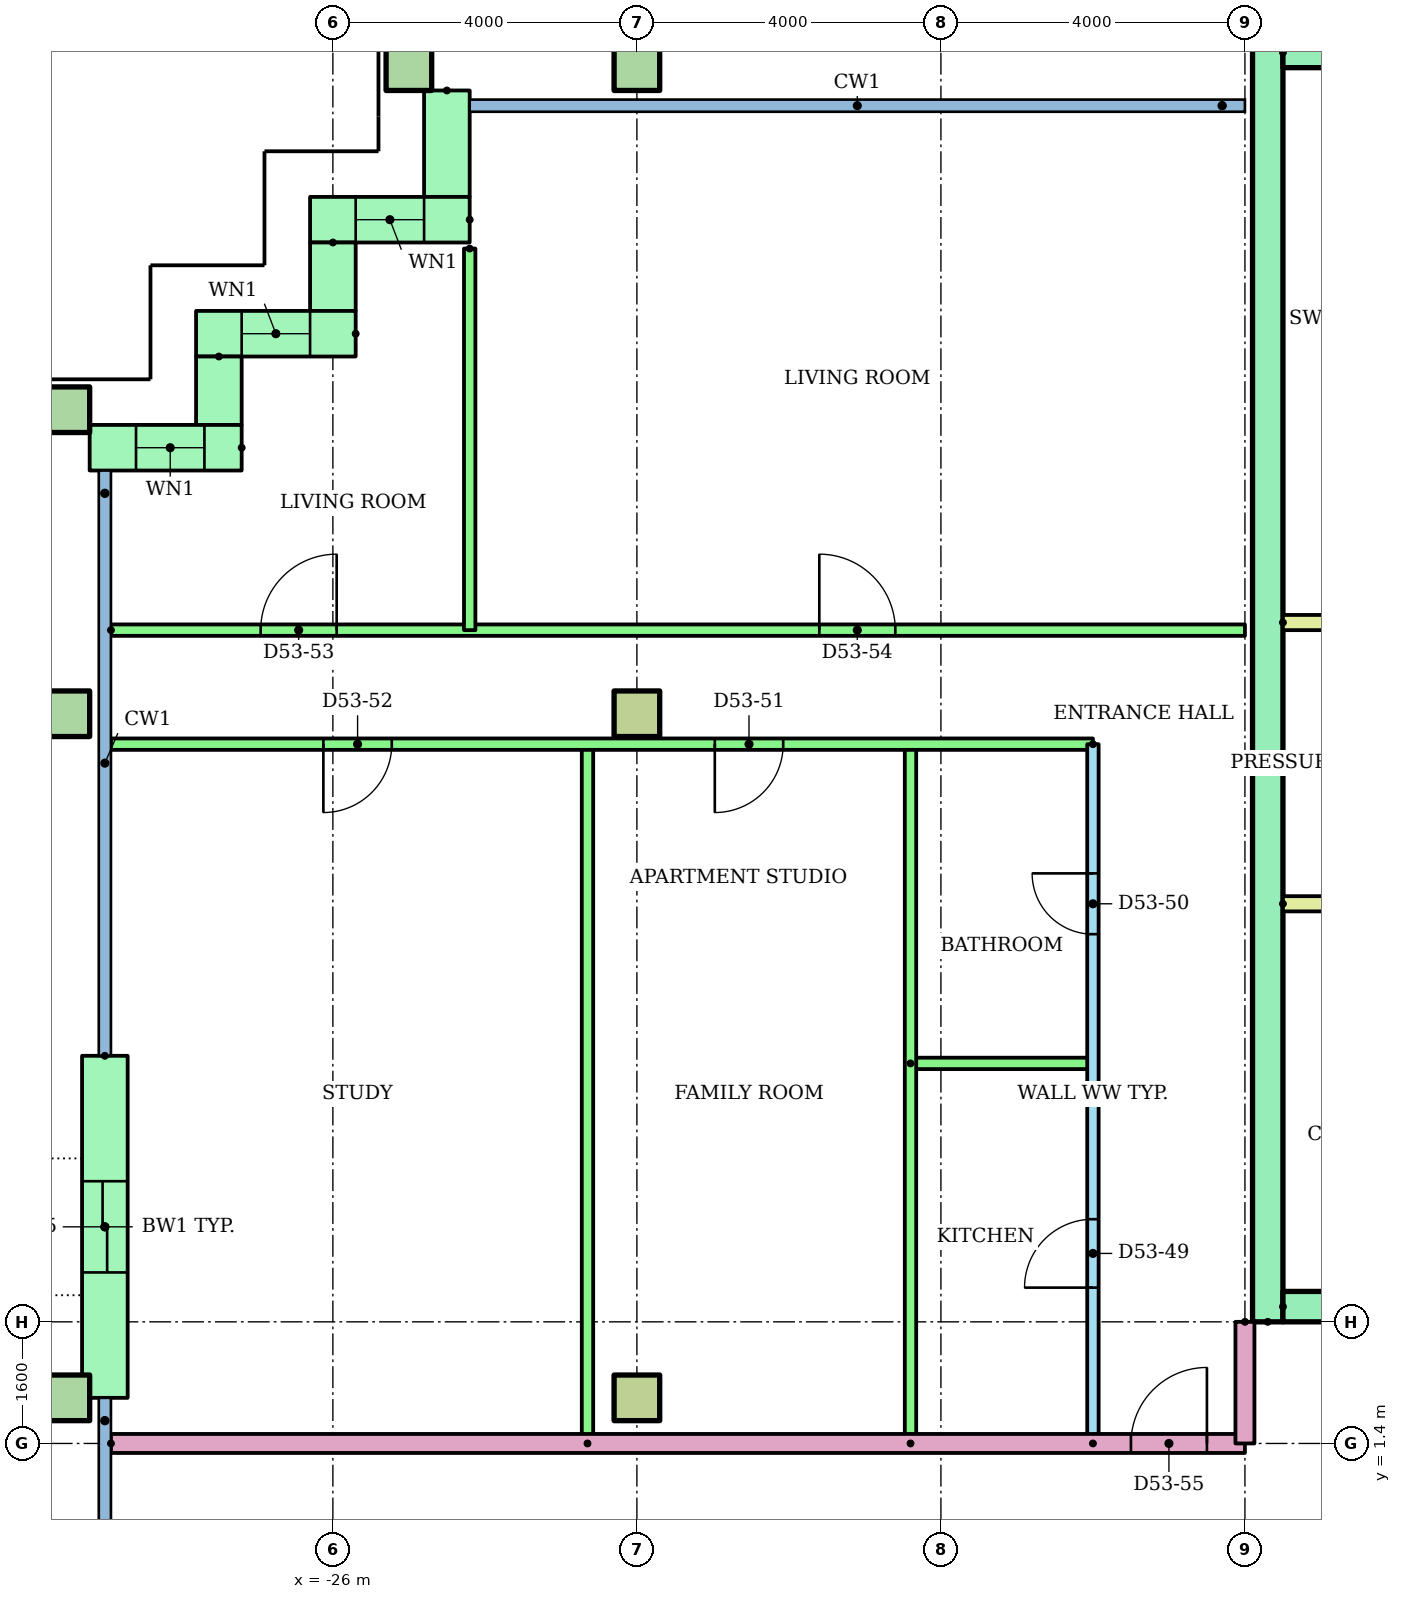
"""IFC4 building model, lengths in metres.
Left out: names, types, materials, properties, quantities, classifications, styles, units other than length and angle.
Written with IfcOpenShell. Run it as: python <this file> out.ifc"""

import sys

from ifc_helpers import new_model, si_unit, direction, frame, frame_2d, origin, origin_2d, place, context, subcontext, project, spatial, rectangle, hollow_rectangle, extrude, element, fill, save


model = new_model("IFC4")
c1 = context("Model", 3, precision=1e-05, world=origin(), true_north=direction((0.0, 1.0)))
c2 = subcontext(c1, "Body", "Model", "MODEL_VIEW")
j1 = project(units=[si_unit("LENGTHUNIT", "METRE"), si_unit("PLANEANGLEUNIT", "RADIAN")], contexts=[c1])
p1 = place(None, origin())
s1 = spatial("IfcSite", under=j1, at=p1, CompositionType="ELEMENT")
p2 = place(p1, origin())
s2 = spatial("IfcBuilding", under=s1, at=p2, CompositionType="ELEMENT")
p3 = place(p2, frame((0.0, 0.0, 207.6)))
s3 = spatial("IfcBuildingStorey", under=s2, at=p3, CompositionType="ELEMENT", Elevation=207.6)
p4 = place(p3, frame((-29.5, 2.0, 0.0)))
e1 = element("IfcColumn", 1, at=p4, inside=s3, PredefinedType="COLUMN", context=c2, shape_type="SweptSolid", body=[
    extrude(hollow_rectangle(XDim=0.6, YDim=0.6, WallThickness=0.03, at=origin_2d()), origin(), (0.0, 0.0, 1.0), 3.2),
])
p5 = place(p3, frame((-22.0, 2.0, 0.0)))
e2 = element("IfcColumn", 2, at=p5, inside=s3, PredefinedType="COLUMN", context=c2, shape_type="SweptSolid", body=[
    extrude(rectangle(XDim=0.6, YDim=0.6, at=origin_2d()), origin(), (0.0, 0.0, 1.0), 3.2),
])
p6 = place(p3, frame((-29.5, 11.0, 0.0)))
e3 = element("IfcColumn", 3, at=p6, inside=s3, PredefinedType="COLUMN", context=c2, shape_type="SweptSolid", body=[
    extrude(hollow_rectangle(XDim=0.6, YDim=0.6, WallThickness=0.03, at=origin_2d()), origin(), (0.0, 0.0, 1.0), 3.2),
])
p7 = place(p3, frame((-22.0, 11.0, 0.0)))
e4 = element("IfcColumn", 4, at=p7, inside=s3, PredefinedType="COLUMN", context=c2, shape_type="SweptSolid", body=[
    extrude(rectangle(XDim=0.6, YDim=0.6, at=origin_2d()), origin(), (0.0, 0.0, 1.0), 3.2),
])
for number, where in (
    (5, (-29.5, 15.0, 0.0)),
    (6, (-25.0, 19.5, 0.0)),
    (7, (-22.0, 19.5, 0.0)),
):
    element("IfcColumn", number, at=place(p3, frame(where)), inside=s3, PredefinedType="COLUMN", context=c2, shape_type="SweptSolid", body=[
        extrude(hollow_rectangle(XDim=0.6, YDim=0.6, WallThickness=0.03, at=origin_2d()), origin(), (0.0, 0.0, 1.0), 3.2),
    ])
p8 = place(p3, frame((-24.5, 19.2, 0.0), z_axis=(0.0, 0.0, 1.0), x_axis=(0.0, -1.0, 0.0)))
e8 = element("IfcWall", 8, at=p8, inside=s3, PredefinedType="STANDARD", context=c2, shape_type="SweptSolid", body=[
    extrude(rectangle(XDim=1.4, YDim=0.6, at=frame_2d((0.7, 0.0))), origin(), (0.0, 0.0, 1.0), 2.92),
])
p9 = place(p3, frame((-24.2, 17.5, 0.0), z_axis=(0.0, 0.0, 1.0), x_axis=(-1.0, 0.0, 0.0)))
e9 = element("IfcWall", 9, at=p9, inside=s3, PredefinedType="STANDARD", context=c2, shape_type="SweptSolid", body=[
    extrude(rectangle(XDim=2.1, YDim=0.6, at=frame_2d((1.05, 0.0))), origin(), (0.0, 0.0, 1.0), 2.92),
])
p10 = place(p9, frame((0.6, 0.0, 0.9)))
e10 = element("IfcOpeningElement", 10, at=p10, cuts=e9, PredefinedType="OPENING", context=c2, shape_type="SweptSolid", body=[
    extrude(rectangle(XDim=0.9, YDim=1.5, at=frame_2d((0.45, 0.75))), frame((0.0, 0.31, 0.0), z_axis=(0.0, -1.0, 0.0), x_axis=(1.0, 0.0, 0.0)), (0.0, 0.0, 1.0), 0.62),
])
p11 = place(p3, frame((-26.0, 17.2, 0.0), z_axis=(0.0, 0.0, 1.0), x_axis=(0.0, -1.0, 0.0)))
e11 = element("IfcWall", 11, at=p11, inside=s3, PredefinedType="STANDARD", context=c2, shape_type="SweptSolid", body=[
    extrude(rectangle(XDim=0.9, YDim=0.6, at=frame_2d((0.45, 0.0))), origin(), (0.0, 0.0, 1.0), 2.92),
])
p12 = place(p3, frame((-25.7, 16.0, 0.0), z_axis=(0.0, 0.0, 1.0), x_axis=(-1.0, 0.0, 0.0)))
e12 = element("IfcWall", 12, at=p12, inside=s3, PredefinedType="STANDARD", context=c2, shape_type="SweptSolid", body=[
    extrude(rectangle(XDim=2.1, YDim=0.6, at=frame_2d((1.05, 0.0))), origin(), (0.0, 0.0, 1.0), 2.92),
])
p13 = place(p12, frame((0.6, 0.0, 0.9)))
e13 = element("IfcOpeningElement", 13, at=p13, cuts=e12, PredefinedType="OPENING", context=c2, shape_type="SweptSolid", body=[
    extrude(rectangle(XDim=0.9, YDim=1.5, at=frame_2d((0.45, 0.75))), frame((0.0, 0.31, 0.0), z_axis=(0.0, -1.0, 0.0), x_axis=(1.0, 0.0, 0.0)), (0.0, 0.0, 1.0), 0.62),
])
p14 = place(p3, frame((-27.5, 15.7, 0.0), z_axis=(0.0, 0.0, 1.0), x_axis=(0.0, -1.0, 0.0)))
e14 = element("IfcWall", 14, at=p14, inside=s3, PredefinedType="STANDARD", context=c2, shape_type="SweptSolid", body=[
    extrude(rectangle(XDim=0.9, YDim=0.6, at=frame_2d((0.45, 0.0))), origin(), (0.0, 0.0, 1.0), 2.92),
])
p15 = place(p3, frame((-27.2, 14.5, 0.0), z_axis=(0.0, 0.0, 1.0), x_axis=(-1.0, 0.0, 0.0)))
e15 = element("IfcWall", 15, at=p15, inside=s3, PredefinedType="STANDARD", context=c2, shape_type="SweptSolid", body=[
    extrude(rectangle(XDim=2.0, YDim=0.6, at=frame_2d((1.0, 0.0))), origin(), (0.0, 0.0, 1.0), 2.92),
])
p16 = place(p15, frame((0.49, 0.0, 0.9)))
e16 = element("IfcOpeningElement", 16, at=p16, cuts=e15, PredefinedType="OPENING", context=c2, shape_type="SweptSolid", body=[
    extrude(rectangle(XDim=0.9, YDim=1.5, at=frame_2d((0.45, 0.75))), frame((0.0, 0.31, 0.0), z_axis=(0.0, -1.0, 0.0), x_axis=(1.0, 0.0, 0.0)), (0.0, 0.0, 1.0), 0.62),
])
p17 = place(p3, frame((-29.0, 6.5, 0.0), z_axis=(0.0, 0.0, 1.0), x_axis=(0.0, -1.0, 0.0)))
e17 = element("IfcWall", 17, at=p17, inside=s3, PredefinedType="STANDARD", context=c2, shape_type="SweptSolid", body=[
    extrude(rectangle(XDim=4.5, YDim=0.6, at=frame_2d((2.25, 0.0))), origin(), (0.0, 0.0, 1.0), 2.92),
])
p18 = place(p17, frame((1.65, 0.0, 0.0)))
e18 = element("IfcOpeningElement", 18, at=p18, cuts=e17, PredefinedType="OPENING", context=c2, shape_type="SweptSolid", body=[
    extrude(rectangle(XDim=1.2, YDim=2.1, at=frame_2d((0.6, 1.05))), frame((0.0, 0.31, 0.0), z_axis=(0.0, -1.0, 0.0), x_axis=(1.0, 0.0, 0.0)), (0.0, 0.0, 1.0), 0.62),
])
p19 = place(p3, frame((-13.7, 3.0, 0.0), z_axis=(0.0, 0.0, 1.0), x_axis=(0.0, 1.0, 0.0)))
e19 = element("IfcWall", 19, at=p19, inside=s3, PredefinedType="SHEAR", context=c2, shape_type="SweptSolid", body=[
    extrude(rectangle(XDim=17.0, YDim=0.4, at=frame_2d((8.5, 0.0))), origin(), (0.0, 0.0, 1.0), 2.92),
])
p20 = place(p3, frame((-13.5, 19.7, 0.0)))
e20 = element("IfcWall", 20, at=p20, inside=s3, PredefinedType="SHEAR", context=c2, shape_type="SweptSolid", body=[
    extrude(rectangle(XDim=27.0, YDim=0.4, at=frame_2d((13.5, 0.0))), origin(), (0.0, 0.0, 1.0), 2.92),
])
p21 = place(p3, frame((-13.5, 3.2, 0.0)))
e21 = element("IfcWall", 21, at=p21, inside=s3, PredefinedType="SHEAR", context=c2, shape_type="SweptSolid", body=[
    extrude(rectangle(XDim=27.0, YDim=0.4, at=frame_2d((13.5, 0.0))), origin(), (0.0, 0.0, 1.0), 2.92),
])
p22 = place(p21, frame((22.083, 0.0, 0.0)))
e22 = element("IfcOpeningElement", 22, at=p22, cuts=e21, PredefinedType="OPENING", context=c2, shape_type="SweptSolid", body=[
    extrude(rectangle(XDim=1.1, YDim=2.1, at=frame_2d((0.55, 1.05))), frame((0.0, 0.21, 0.0), z_axis=(0.0, -1.0, 0.0), x_axis=(1.0, 0.0, 0.0)), (0.0, 0.0, 1.0), 0.42),
])
p23 = place(p21, frame((25.128, 0.0, 0.0)))
e23 = element("IfcOpeningElement", 23, at=p23, cuts=e21, PredefinedType="OPENING", context=c2, shape_type="SweptSolid", body=[
    extrude(rectangle(XDim=1.1, YDim=2.1, at=frame_2d((0.55, 1.05))), frame((0.0, 0.21, 0.0), z_axis=(0.0, -1.0, 0.0), x_axis=(1.0, 0.0, 0.0)), (0.0, 0.0, 1.0), 0.42),
])
p24 = place(p21, frame((12.6, 0.0, 0.0)))
e24 = element("IfcOpeningElement", 24, at=p24, cuts=e21, PredefinedType="OPENING", context=c2, shape_type="SweptSolid", body=[
    extrude(rectangle(XDim=1.8, YDim=2.1, at=frame_2d((0.9, 1.05))), frame((0.0, 0.21, 0.0), z_axis=(0.0, -1.0, 0.0), x_axis=(1.0, 0.0, 0.0)), (0.0, 0.0, 1.0), 0.42),
])
for number, where in (
    (25, (-13.5, 8.5, 0.0)),
    (26, (-13.5, 12.2, 0.0)),
):
    element("IfcWall", number, at=place(p3, frame(where)), inside=s3, PredefinedType="PARTITIONING", context=c2, shape_type="SweptSolid", body=[
        extrude(rectangle(XDim=3.9, YDim=0.2, at=frame_2d((1.95, 0.0))), origin(), (0.0, 0.0, 1.0), 2.92),
    ])
p25 = place(p3, frame((-16.0, 1.4, 0.0), z_axis=(0.0, 0.0, 1.0), x_axis=(0.0, 1.0, 0.0)))
e27 = element("IfcWall", 27, at=p25, inside=s3, PredefinedType="PARTITIONING", context=c2, shape_type="SweptSolid", body=[
    extrude(rectangle(XDim=9.2, YDim=0.15, at=frame_2d((4.6, 0.0))), origin(), (0.0, 0.0, 1.0), 2.4),
])
p26 = place(p25, frame((2.05, 0.0, 0.0)))
e28 = element("IfcOpeningElement", 28, at=p26, cuts=e27, PredefinedType="OPENING", context=c2, shape_type="SweptSolid", body=[
    extrude(rectangle(XDim=0.9, YDim=2.1, at=frame_2d((0.45, 1.05))), frame((0.0, 0.085, 0.0), z_axis=(0.0, -1.0, 0.0), x_axis=(1.0, 0.0, 0.0)), (0.0, 0.0, 1.0), 0.17),
])
p27 = place(p25, frame((6.7, 0.0, 0.0)))
e29 = element("IfcOpeningElement", 29, at=p27, cuts=e27, PredefinedType="OPENING", context=c2, shape_type="SweptSolid", body=[
    extrude(rectangle(XDim=0.8, YDim=2.1, at=frame_2d((0.4, 1.05))), frame((0.0, 0.085, 0.0), z_axis=(0.0, -1.0, 0.0), x_axis=(1.0, 0.0, 0.0)), (0.0, 0.0, 1.0), 0.17),
])
p28 = place(p3, frame((-18.4, 6.4, 0.0)))
e30 = element("IfcWall", 30, at=p28, inside=s3, PredefinedType="PARTITIONING", context=c2, shape_type="SweptSolid", body=[
    extrude(rectangle(XDim=2.4, YDim=0.15, at=frame_2d((1.2, 0.0))), origin(), (0.0, 0.0, 1.0), 2.4),
])
for number, where, z_axis, x_axis in (
    (31, (-18.4, 1.4, 0.0), (0.0, 0.0, 1.0), (0.0, 1.0, 0.0)),
    (32, (-22.65, 1.4, 0.0), (0.0, 0.0, 1.0), (0.0, 1.0, 0.0)),
):
    element("IfcWall", number, at=place(p3, frame(where, z_axis=z_axis, x_axis=x_axis)), inside=s3, PredefinedType="PARTITIONING", context=c2, shape_type="SweptSolid", body=[
        extrude(rectangle(XDim=9.2, YDim=0.15, at=frame_2d((4.6, 0.0))), origin(), (0.0, 0.0, 1.0), 2.4),
    ])
p29 = place(p3, frame((-16.0, 10.6, 0.0), z_axis=(0.0, 0.0, 1.0), x_axis=(-1.0, 0.0, 0.0)))
e33 = element("IfcWall", 33, at=p29, inside=s3, PredefinedType="PARTITIONING", context=c2, shape_type="SweptSolid", body=[
    extrude(rectangle(XDim=12.92, YDim=0.15, at=frame_2d((6.46, 0.0))), origin(), (0.0, 0.0, 1.0), 2.4),
])
p30 = place(p29, frame((4.075, 0.0, 0.0)))
e34 = element("IfcOpeningElement", 34, at=p30, cuts=e33, PredefinedType="OPENING", context=c2, shape_type="SweptSolid", body=[
    extrude(rectangle(XDim=0.9, YDim=2.1, at=frame_2d((0.45, 1.05))), frame((0.0, 0.085, 0.0), z_axis=(0.0, -1.0, 0.0), x_axis=(1.0, 0.0, 0.0)), (0.0, 0.0, 1.0), 0.17),
])
p31 = place(p29, frame((9.225, 0.0, 0.0)))
e35 = element("IfcOpeningElement", 35, at=p31, cuts=e33, PredefinedType="OPENING", context=c2, shape_type="SweptSolid", body=[
    extrude(rectangle(XDim=0.9, YDim=2.1, at=frame_2d((0.45, 1.05))), frame((0.0, 0.085, 0.0), z_axis=(0.0, -1.0, 0.0), x_axis=(1.0, 0.0, 0.0)), (0.0, 0.0, 1.0), 0.17),
])
p32 = place(p3, frame((-28.92, 12.1, 0.0)))
e36 = element("IfcWall", 36, at=p32, inside=s3, PredefinedType="PARTITIONING", context=c2, shape_type="SweptSolid", body=[
    extrude(rectangle(XDim=14.92, YDim=0.15, at=frame_2d((7.46, 0.0))), origin(), (0.0, 0.0, 1.0), 2.4),
])
p33 = place(p32, frame((1.97, 0.0, 0.0)))
e37 = element("IfcOpeningElement", 37, at=p33, cuts=e36, PredefinedType="OPENING", context=c2, shape_type="SweptSolid", body=[
    extrude(rectangle(XDim=1.0, YDim=2.1, at=frame_2d((0.5, 1.05))), frame((0.0, 0.085, 0.0), z_axis=(0.0, -1.0, 0.0), x_axis=(1.0, 0.0, 0.0)), (0.0, 0.0, 1.0), 0.17),
])
p34 = place(p32, frame((9.32, 0.0, 0.0)))
e38 = element("IfcOpeningElement", 38, at=p34, cuts=e36, PredefinedType="OPENING", context=c2, shape_type="SweptSolid", body=[
    extrude(rectangle(XDim=1.0, YDim=2.1, at=frame_2d((0.5, 1.05))), frame((0.0, 0.085, 0.0), z_axis=(0.0, -1.0, 0.0), x_axis=(1.0, 0.0, 0.0)), (0.0, 0.0, 1.0), 0.17),
])
p35 = place(p3, frame((-24.2, 17.12, 0.0), z_axis=(0.0, 0.0, 1.0), x_axis=(0.0, -1.0, 0.0)))
e39 = element("IfcWall", 39, at=p35, inside=s3, PredefinedType="PARTITIONING", context=c2, shape_type="SweptSolid", body=[
    extrude(rectangle(XDim=5.02, YDim=0.15, at=frame_2d((2.51, 0.0))), origin(), (0.0, 0.0, 1.0), 2.4),
])
p36 = place(p3, frame((-28.92, 1.4, 0.0)))
e40 = element("IfcWall", 40, at=p36, inside=s3, PredefinedType="PARTITIONING", context=c2, shape_type="SweptSolid", body=[
    extrude(rectangle(XDim=14.92, YDim=0.25, at=frame_2d((7.46, 0.0))), origin(), (0.0, 0.0, 1.0), 2.4),
])
p37 = place(p36, frame((13.42, 0.0, 0.0)))
e41 = element("IfcOpeningElement", 41, at=p37, cuts=e40, PredefinedType="OPENING", context=c2, shape_type="SweptSolid", body=[
    extrude(rectangle(XDim=1.0, YDim=2.1, at=frame_2d((0.5, 1.05))), frame((0.0, 0.135, 0.0), z_axis=(0.0, -1.0, 0.0), x_axis=(1.0, 0.0, 0.0)), (0.0, 0.0, 1.0), 0.27),
])
p38 = place(p3, frame((-14.0, 3.0, 0.0), z_axis=(0.0, 0.0, 1.0), x_axis=(0.0, -1.0, 0.0)))
e42 = element("IfcWall", 42, at=p38, inside=s3, PredefinedType="PARTITIONING", context=c2, shape_type="SweptSolid", body=[
    extrude(rectangle(XDim=1.6, YDim=0.25, at=frame_2d((0.8, 0.0))), origin(), (0.0, 0.0, 1.0), 2.4),
])
p39 = place(p10, origin())
e43 = element("IfcWindow", 43, at=p39, inside=s3, PartitioningType="SINGLE_PANEL", PredefinedType="WINDOW", context=c2, shape_type="SweptSolid", body=[
    extrude(rectangle(XDim=0.9, YDim=1.5, at=frame_2d((0.45, 0.75))), frame((0.0, 0.03, 0.0), z_axis=(0.0, -1.0, 0.0), x_axis=(1.0, 0.0, 0.0)), (0.0, 0.0, 1.0), 0.06),
])
fill(e10, e43)
p40 = place(p13, origin())
e44 = element("IfcWindow", 44, at=p40, inside=s3, PartitioningType="SINGLE_PANEL", PredefinedType="WINDOW", context=c2, shape_type="SweptSolid", body=[
    extrude(rectangle(XDim=0.9, YDim=1.5, at=frame_2d((0.45, 0.75))), frame((0.0, 0.03, 0.0), z_axis=(0.0, -1.0, 0.0), x_axis=(1.0, 0.0, 0.0)), (0.0, 0.0, 1.0), 0.06),
])
fill(e13, e44)
p41 = place(p16, origin())
e45 = element("IfcWindow", 45, at=p41, inside=s3, PartitioningType="SINGLE_PANEL", PredefinedType="WINDOW", context=c2, shape_type="SweptSolid", body=[
    extrude(rectangle(XDim=0.9, YDim=1.5, at=frame_2d((0.45, 0.75))), frame((0.0, 0.03, 0.0), z_axis=(0.0, -1.0, 0.0), x_axis=(1.0, 0.0, 0.0)), (0.0, 0.0, 1.0), 0.06),
])
fill(e16, e45)
p42 = place(p26, origin())
e46 = element("IfcDoor", 46, at=p42, inside=s3, OperationType="SINGLE_SWING_LEFT", PredefinedType="DOOR", context=c2, shape_type="SweptSolid", body=[
    extrude(rectangle(XDim=0.9, YDim=2.1, at=frame_2d((0.45, 1.05))), frame((0.0, 0.025, 0.0), z_axis=(0.0, -1.0, 0.0), x_axis=(1.0, 0.0, 0.0)), (0.0, 0.0, 1.0), 0.05),
])
fill(e28, e46)
p43 = place(p27, origin())
e47 = element("IfcDoor", 47, at=p43, inside=s3, OperationType="SINGLE_SWING_RIGHT", PredefinedType="DOOR", context=c2, shape_type="SweptSolid", body=[
    extrude(rectangle(XDim=0.8, YDim=2.1, at=frame_2d((0.4, 1.05))), frame((0.0, 0.025, 0.0), z_axis=(0.0, -1.0, 0.0), x_axis=(1.0, 0.0, 0.0)), (0.0, 0.0, 1.0), 0.05),
])
fill(e29, e47)
p44 = place(p30, origin())
e48 = element("IfcDoor", 48, at=p44, inside=s3, OperationType="SINGLE_SWING_RIGHT", PredefinedType="DOOR", context=c2, shape_type="SweptSolid", body=[
    extrude(rectangle(XDim=0.9, YDim=2.1, at=frame_2d((0.45, 1.05))), frame((0.0, 0.025, 0.0), z_axis=(0.0, -1.0, 0.0), x_axis=(1.0, 0.0, 0.0)), (0.0, 0.0, 1.0), 0.05),
])
fill(e34, e48)
p45 = place(p31, origin())
e49 = element("IfcDoor", 49, at=p45, inside=s3, OperationType="SINGLE_SWING_RIGHT", PredefinedType="DOOR", context=c2, shape_type="SweptSolid", body=[
    extrude(rectangle(XDim=0.9, YDim=2.1, at=frame_2d((0.45, 1.05))), frame((0.0, 0.025, 0.0), z_axis=(0.0, -1.0, 0.0), x_axis=(1.0, 0.0, 0.0)), (0.0, 0.0, 1.0), 0.05),
])
fill(e35, e49)
p46 = place(p33, origin())
e50 = element("IfcDoor", 50, at=p46, inside=s3, OperationType="SINGLE_SWING_RIGHT", PredefinedType="DOOR", context=c2, shape_type="SweptSolid", body=[
    extrude(rectangle(XDim=1.0, YDim=2.1, at=frame_2d((0.5, 1.05))), frame((0.0, 0.025, 0.0), z_axis=(0.0, -1.0, 0.0), x_axis=(1.0, 0.0, 0.0)), (0.0, 0.0, 1.0), 0.05),
])
fill(e37, e50)
p47 = place(p34, origin())
e51 = element("IfcDoor", 51, at=p47, inside=s3, OperationType="SINGLE_SWING_LEFT", PredefinedType="DOOR", context=c2, shape_type="SweptSolid", body=[
    extrude(rectangle(XDim=1.0, YDim=2.1, at=frame_2d((0.5, 1.05))), frame((0.0, 0.025, 0.0), z_axis=(0.0, -1.0, 0.0), x_axis=(1.0, 0.0, 0.0)), (0.0, 0.0, 1.0), 0.05),
])
fill(e38, e51)
p48 = place(p37, origin())
e52 = element("IfcDoor", 52, at=p48, inside=s3, OperationType="SINGLE_SWING_RIGHT", PredefinedType="DOOR", context=c2, shape_type="SweptSolid", body=[
    extrude(rectangle(XDim=1.0, YDim=2.1, at=frame_2d((0.5, 1.05))), frame((0.0, 0.025, 0.0), z_axis=(0.0, -1.0, 0.0), x_axis=(1.0, 0.0, 0.0)), (0.0, 0.0, 1.0), 0.05),
])
fill(e41, e52)
p49 = place(p18, origin())
e53 = element("IfcDoor", 53, at=p49, inside=s3, OperationType="SLIDING_TO_LEFT", PredefinedType="DOOR", context=c2, shape_type="SweptSolid", body=[
    extrude(rectangle(XDim=1.2, YDim=2.1, at=frame_2d((0.6, 1.05))), frame((0.0, 0.025, 0.0), z_axis=(0.0, -1.0, 0.0), x_axis=(1.0, 0.0, 0.0)), (0.0, 0.0, 1.0), 0.05),
])
fill(e18, e53)
save(model, sys.argv[1])
